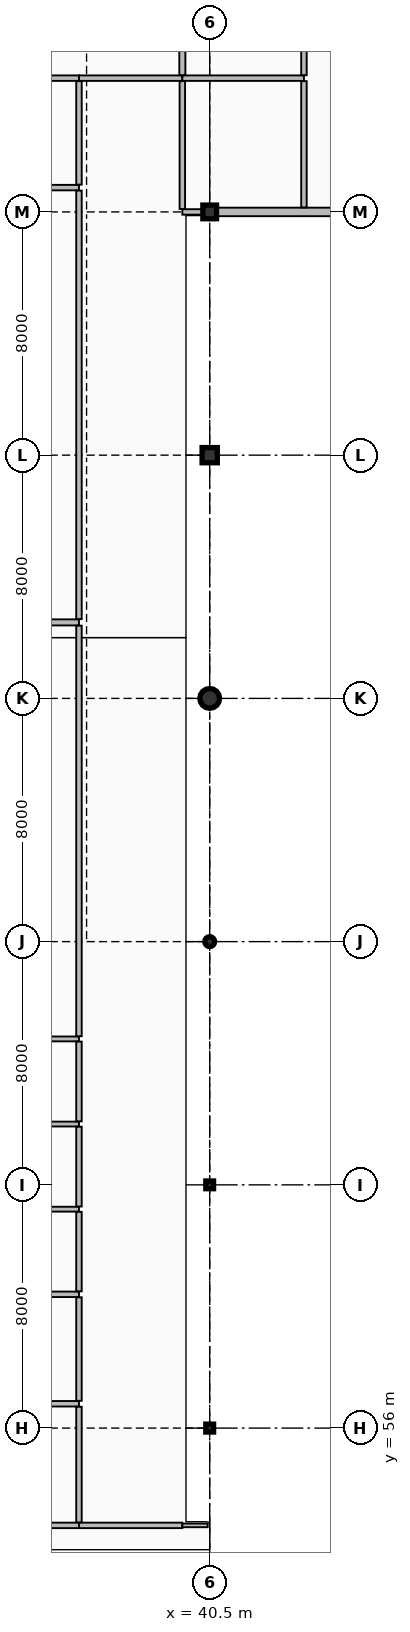
"""IFC4 building model, lengths in metres.
Left out: names, types, materials, properties, quantities, classifications, styles, units other than length and angle.
Written with IfcOpenShell. Run it as: python <this file> out.ifc"""

import sys

from ifc_helpers import new_model, si_unit, direction, frame, frame_2d, origin, origin_2d, place, context, subcontext, project, spatial, rectangle, hollow_rectangle, circle, hollow_circle, i_section, extrude, element, fill, save


model = new_model("IFC4")
c1 = context("Model", 3, precision=1e-05, world=origin(), true_north=direction((0.0, 1.0)))
c2 = subcontext(c1, "Body", "Model", "MODEL_VIEW")
j1 = project(units=[si_unit("LENGTHUNIT", "METRE"), si_unit("PLANEANGLEUNIT", "RADIAN")], contexts=[c1])
p1 = place(None, origin())
s1 = spatial("IfcSite", under=j1, at=p1, CompositionType="ELEMENT")
p2 = place(p1, origin())
s2 = spatial("IfcBuilding", under=s1, at=p2, CompositionType="ELEMENT")
p3 = place(p2, frame((0.0, 0.0, 24.9)))
s3 = spatial("IfcBuildingStorey", under=s2, at=p3, CompositionType="ELEMENT", Elevation=24.9)
p4 = place(p3, frame((40.5, 56.0, 0.0), z_axis=(0.0, 0.0, 1.0), x_axis=(1.0, 0.0, 0.0)))
e1 = element("IfcColumn", 1, at=p4, inside=s3, PredefinedType="COLUMN", context=c2, shape_type="SweptSolid", body=[
    extrude(i_section(OverallWidth=0.256, OverallDepth=0.26, WebThickness=0.011, FlangeThickness=0.017, FilletRadius=0.013, at=origin_2d()), origin(), (0.0, 0.0, 1.0), 4.2),
])
p5 = place(p3, frame((40.5, 64.0, 0.0), z_axis=(0.0, 0.0, 1.0), x_axis=(1.0, 0.0, 0.0)))
e2 = element("IfcColumn", 2, at=p5, inside=s3, PredefinedType="COLUMN", context=c2, shape_type="SweptSolid", body=[
    extrude(hollow_rectangle(XDim=0.254, YDim=0.254, WallThickness=0.013, InnerFilletRadius=0.013, OuterFilletRadius=0.025, at=origin_2d()), origin(), (0.0, 0.0, 1.0), 4.2),
])
p6 = place(p3, frame((40.5, 72.0, 0.0), z_axis=(0.0, 0.0, 1.0), x_axis=(1.0, 0.0, 0.0)))
e3 = element("IfcColumn", 3, at=p6, inside=s3, PredefinedType="COLUMN", context=c2, shape_type="SweptSolid", body=[
    extrude(hollow_circle(Radius=0.162, WallThickness=0.013, at=origin_2d()), origin(), (0.0, 0.0, 1.0), 4.2),
])
p7 = place(p3, frame((40.5, 80.0, 0.0), z_axis=(0.0, 0.0, 1.0), x_axis=(1.0, 0.0, 0.0)))
e4 = element("IfcColumn", 4, at=p7, inside=s3, PredefinedType="COLUMN", context=c2, shape_type="SweptSolid", body=[
    extrude(circle(Radius=0.325, at=origin_2d()), origin(), (0.0, 0.0, 1.0), 4.2),
])
p8 = place(p3, frame((40.5, 88.0, 0.0), z_axis=(0.0, 0.0, 1.0), x_axis=(1.0, 0.0, 0.0)))
e5 = element("IfcColumn", 5, at=p8, inside=s3, PredefinedType="COLUMN", context=c2, shape_type="SweptSolid", body=[
    extrude(rectangle(XDim=0.5, YDim=0.5, at=origin_2d()), origin(), (0.0, 0.0, 1.0), 4.2),
])
p9 = place(p3, frame((40.5, 96.0, 0.0), z_axis=(0.0, 0.0, 1.0), x_axis=(1.0, 0.0, 0.0)))
e6 = element("IfcColumn", 6, at=p9, inside=s3, PredefinedType="COLUMN", context=c2, shape_type="SweptSolid", body=[
    extrude(rectangle(XDim=0.45, YDim=0.45, at=origin_2d()), origin(), (0.0, 0.0, 1.0), 4.2),
])
p10 = place(p3, frame((40.68, 96.0, 0.0), z_axis=(0.0, 0.0, 1.0), x_axis=(1.0, 0.0, 0.0)))
e7 = element("IfcWall", 7, at=p10, inside=s3, PredefinedType="SOLIDWALL", context=c2, shape_type="SweptSolid", body=[
    extrude(rectangle(XDim=5.52, YDim=0.28, at=frame_2d((2.76, 0.0))), origin(), (0.0, 0.0, 1.0), 3.402),
])
p11 = place(p3, frame((29.583, 82.5, 0.0), z_axis=(0.0, 0.0, 1.0), x_axis=(1.0, 0.0, 0.0)))
e8 = element("IfcWall", 8, at=p11, inside=s3, PredefinedType="PARTITIONING", context=c2, shape_type="SweptSolid", body=[
    extrude(rectangle(XDim=6.617, YDim=0.2, at=frame_2d((3.309, 0.0))), origin(), (0.0, 0.0, 1.0), 3.96),
])
p12 = place(p3, frame((28.2, 52.8, 0.0), z_axis=(0.0, 0.0, 1.0), x_axis=(1.0, 0.0, 0.0)))
e9 = element("IfcWall", 9, at=p12, inside=s3, PredefinedType="PARTITIONING", context=c2, shape_type="SweptSolid", body=[
    extrude(rectangle(XDim=8.0, YDim=0.18, at=frame_2d((4.0, 0.0))), origin(), (0.0, 0.0, 1.0), 3.96),
])
p13 = place(p12, frame((3.5, 0.0, 0.0)))
e10 = element("IfcOpeningElement", 10, at=p13, cuts=e9, PredefinedType="OPENING", context=c2, shape_type="SweptSolid", body=[
    extrude(rectangle(XDim=1.0, YDim=2.2, at=frame_2d((0.5, 1.1))), frame((0.0, 0.1, 0.0), z_axis=(0.0, -1.0, 0.0), x_axis=(1.0, 0.0, 0.0)), (0.0, 0.0, 1.0), 0.2),
])
p14 = place(p3, frame((29.2, 96.8, 0.0), z_axis=(0.0, 0.0, 1.0), x_axis=(1.0, 0.0, 0.0)))
e11 = element("IfcWall", 11, at=p14, inside=s3, PredefinedType="PARTITIONING", context=c2, shape_type="SweptSolid", body=[
    extrude(rectangle(XDim=7.0, YDim=0.18, at=frame_2d((3.5, 0.0))), origin(), (0.0, 0.0, 1.0), 3.96),
])
p15 = place(p3, frame((29.425, 100.4, 0.0), z_axis=(0.0, 0.0, 1.0), x_axis=(1.0, 0.0, 0.0)))
e12 = element("IfcWall", 12, at=p15, inside=s3, PredefinedType="PARTITIONING", context=c2, shape_type="SweptSolid", body=[
    extrude(rectangle(XDim=6.775, YDim=0.18, at=frame_2d((3.387, 0.0))), origin(), (0.0, 0.0, 1.0), 3.96),
])
p16 = place(p15, frame((2.913, 0.0, 0.0)))
e13 = element("IfcOpeningElement", 13, at=p16, cuts=e12, PredefinedType="OPENING", context=c2, shape_type="SweptSolid", body=[
    extrude(rectangle(XDim=0.95, YDim=2.15, at=frame_2d((0.475, 1.075))), frame((0.0, 0.1, 0.0), z_axis=(0.0, -1.0, 0.0), x_axis=(1.0, 0.0, 0.0)), (0.0, 0.0, 1.0), 0.2),
])
p17 = place(p3, frame((31.8, 56.8, 0.0), z_axis=(0.0, 0.0, 1.0), x_axis=(1.0, 0.0, 0.0)))
e14 = element("IfcWall", 14, at=p17, inside=s3, PredefinedType="PARTITIONING", context=c2, shape_type="SweptSolid", body=[
    extrude(rectangle(XDim=4.4, YDim=0.18, at=frame_2d((2.2, 0.0))), origin(), (0.0, 0.0, 1.0), 3.96),
])
p18 = place(p3, frame((32.025, 60.4, 0.0), z_axis=(0.0, 0.0, 1.0), x_axis=(1.0, 0.0, 0.0)))
e15 = element("IfcWall", 15, at=p18, inside=s3, PredefinedType="PARTITIONING", context=c2, shape_type="SweptSolid", body=[
    extrude(rectangle(XDim=4.175, YDim=0.18, at=frame_2d((2.087, 0.0))), origin(), (0.0, 0.0, 1.0), 3.96),
])
for number, where, z_axis, x_axis in (
    (16, (32.033, 63.2, 0.0), (0.0, 0.0, 1.0), (1.0, 0.0, 0.0)),
    (17, (32.033, 66.0, 0.0), (0.0, 0.0, 1.0), (1.0, 0.0, 0.0)),
):
    element("IfcWall", number, at=place(p3, frame(where, z_axis=z_axis, x_axis=x_axis)), inside=s3, PredefinedType="PARTITIONING", context=c2, shape_type="SweptSolid", body=[
        extrude(rectangle(XDim=4.167, YDim=0.16, at=frame_2d((2.083, 0.0))), origin(), (0.0, 0.0, 1.0), 3.96),
    ])
p19 = place(p3, frame((32.025, 68.8, 0.0), z_axis=(0.0, 0.0, 1.0), x_axis=(1.0, 0.0, 0.0)))
e18 = element("IfcWall", 18, at=p19, inside=s3, PredefinedType="PARTITIONING", context=c2, shape_type="SweptSolid", body=[
    extrude(rectangle(XDim=4.175, YDim=0.16, at=frame_2d((2.087, 0.0))), origin(), (0.0, 0.0, 1.0), 3.96),
])
for number, where, z_axis, x_axis in (
    (19, (36.2, 52.8, 0.0), (0.0, 0.0, 1.0), (1.0, 0.0, 0.0)),
    (20, (36.2, 100.4, 0.0), (0.0, 0.0, 1.0), (1.0, 0.0, 0.0)),
):
    element("IfcWall", number, at=place(p3, frame(where, z_axis=z_axis, x_axis=x_axis)), inside=s3, PredefinedType="PARTITIONING", context=c2, shape_type="SweptSolid", body=[
        extrude(rectangle(XDim=3.4, YDim=0.18, at=frame_2d((1.7, 0.0))), origin(), (0.0, 0.0, 1.0), 3.96),
    ])
p20 = place(p3, frame((39.6, 52.8, 0.0), z_axis=(0.0, 0.0, 1.0), x_axis=(1.0, 0.0, 0.0)))
e21 = element("IfcWall", 21, at=p20, inside=s3, PredefinedType="PARTITIONING", context=c2, shape_type="SweptSolid", body=[
    extrude(rectangle(XDim=0.835, YDim=0.12, at=frame_2d((0.417, 0.0))), origin(), (0.0, 0.0, 1.0), 3.96),
])
p21 = place(p3, frame((39.6, 96.0, 0.0), z_axis=(0.0, 0.0, 1.0), x_axis=(1.0, 0.0, 0.0)))
e22 = element("IfcWall", 22, at=p21, inside=s3, PredefinedType="PARTITIONING", context=c2, shape_type="SweptSolid", body=[
    extrude(rectangle(XDim=0.667, YDim=0.18, at=frame_2d((0.333, 0.0))), origin(), (0.0, 0.0, 1.0), 3.489),
])
p22 = place(p3, frame((39.6, 100.4, 0.0), z_axis=(0.0, 0.0, 1.0), x_axis=(1.0, 0.0, 0.0)))
e23 = element("IfcWall", 23, at=p22, inside=s3, PredefinedType="PARTITIONING", context=c2, shape_type="SweptSolid", body=[
    extrude(rectangle(XDim=4.0, YDim=0.18, at=frame_2d((2.0, 0.0))), origin(), (0.0, 0.0, 1.0), 3.96),
])
p23 = place(p3, frame((36.2, 52.898, 0.0), z_axis=(0.0, 0.0, 1.0), x_axis=(0.0, 1.0, 0.0)))
e24 = element("IfcWall", 24, at=p23, inside=s3, PredefinedType="PARTITIONING", context=c2, shape_type="SweptSolid", body=[
    extrude(rectangle(XDim=3.804, YDim=0.18, at=frame_2d((1.902, 0.0))), origin(), (0.0, 0.0, 1.0), 3.96),
])
p24 = place(p23, frame((1.352, 0.0, 0.0)))
e25 = element("IfcOpeningElement", 25, at=p24, cuts=e24, PredefinedType="OPENING", context=c2, shape_type="SweptSolid", body=[
    extrude(rectangle(XDim=1.1, YDim=2.2, at=frame_2d((0.55, 1.1))), frame((0.0, 0.1, 0.0), z_axis=(0.0, -1.0, 0.0), x_axis=(1.0, 0.0, 0.0)), (0.0, 0.0, 1.0), 0.2),
])
p25 = place(p3, frame((36.2, 56.898, 0.0), z_axis=(0.0, 0.0, 1.0), x_axis=(0.0, 1.0, 0.0)))
e26 = element("IfcWall", 26, at=p25, inside=s3, PredefinedType="PARTITIONING", context=c2, shape_type="SweptSolid", body=[
    extrude(rectangle(XDim=3.404, YDim=0.18, at=frame_2d((1.702, 0.0))), origin(), (0.0, 0.0, 1.0), 3.96),
])
p26 = place(p25, frame((1.202, 0.0, 0.0)))
e27 = element("IfcOpeningElement", 27, at=p26, cuts=e26, PredefinedType="OPENING", context=c2, shape_type="SweptSolid", body=[
    extrude(rectangle(XDim=1.0, YDim=2.15, at=frame_2d((0.5, 1.075))), frame((0.0, 0.1, 0.0), z_axis=(0.0, -1.0, 0.0), x_axis=(1.0, 0.0, 0.0)), (0.0, 0.0, 1.0), 0.2),
])
p27 = place(p3, frame((36.2, 60.498, 0.0), z_axis=(0.0, 0.0, 1.0), x_axis=(0.0, 1.0, 0.0)))
e28 = element("IfcWall", 28, at=p27, inside=s3, PredefinedType="PARTITIONING", context=c2, shape_type="SweptSolid", body=[
    extrude(rectangle(XDim=2.614, YDim=0.18, at=frame_2d((1.307, 0.0))), origin(), (0.0, 0.0, 1.0), 3.96),
])
p28 = place(p27, frame((0.832, 0.0, 0.0)))
e29 = element("IfcOpeningElement", 29, at=p28, cuts=e28, PredefinedType="OPENING", context=c2, shape_type="SweptSolid", body=[
    extrude(rectangle(XDim=0.95, YDim=2.1, at=frame_2d((0.475, 1.05))), frame((0.0, 0.1, 0.0), z_axis=(0.0, -1.0, 0.0), x_axis=(1.0, 0.0, 0.0)), (0.0, 0.0, 1.0), 0.2),
])
p29 = place(p3, frame((36.2, 63.288, 0.0), z_axis=(0.0, 0.0, 1.0), x_axis=(0.0, 1.0, 0.0)))
e30 = element("IfcWall", 30, at=p29, inside=s3, PredefinedType="PARTITIONING", context=c2, shape_type="SweptSolid", body=[
    extrude(rectangle(XDim=2.624, YDim=0.18, at=frame_2d((1.312, 0.0))), origin(), (0.0, 0.0, 1.0), 3.96),
])
p30 = place(p29, frame((0.837, 0.0, 0.0)))
e31 = element("IfcOpeningElement", 31, at=p30, cuts=e30, PredefinedType="OPENING", context=c2, shape_type="SweptSolid", body=[
    extrude(rectangle(XDim=0.95, YDim=2.1, at=frame_2d((0.475, 1.05))), frame((0.0, 0.1, 0.0), z_axis=(0.0, -1.0, 0.0), x_axis=(1.0, 0.0, 0.0)), (0.0, 0.0, 1.0), 0.2),
])
p31 = place(p3, frame((36.2, 66.088, 0.0), z_axis=(0.0, 0.0, 1.0), x_axis=(0.0, 1.0, 0.0)))
e32 = element("IfcWall", 32, at=p31, inside=s3, PredefinedType="PARTITIONING", context=c2, shape_type="SweptSolid", body=[
    extrude(rectangle(XDim=2.624, YDim=0.18, at=frame_2d((1.312, 0.0))), origin(), (0.0, 0.0, 1.0), 3.96),
])
p32 = place(p31, frame((0.812, 0.0, 0.0)))
e33 = element("IfcOpeningElement", 33, at=p32, cuts=e32, PredefinedType="OPENING", context=c2, shape_type="SweptSolid", body=[
    extrude(rectangle(XDim=1.0, YDim=2.15, at=frame_2d((0.5, 1.075))), frame((0.0, 0.1, 0.0), z_axis=(0.0, -1.0, 0.0), x_axis=(1.0, 0.0, 0.0)), (0.0, 0.0, 1.0), 0.2),
])
p33 = place(p3, frame((36.2, 68.888, 0.0), z_axis=(0.0, 0.0, 1.0), x_axis=(0.0, 1.0, 0.0)))
e34 = element("IfcWall", 34, at=p33, inside=s3, PredefinedType="PARTITIONING", context=c2, shape_type="SweptSolid", body=[
    extrude(rectangle(XDim=13.504, YDim=0.18, at=frame_2d((6.752, 0.0))), origin(), (0.0, 0.0, 1.0), 3.545),
])
p34 = place(p33, frame((6.202, 0.0, 0.0)))
e35 = element("IfcOpeningElement", 35, at=p34, cuts=e34, PredefinedType="OPENING", context=c2, shape_type="SweptSolid", body=[
    extrude(rectangle(XDim=1.1, YDim=2.2, at=frame_2d((0.55, 1.1))), frame((0.0, 0.1, 0.0), z_axis=(0.0, -1.0, 0.0), x_axis=(1.0, 0.0, 0.0)), (0.0, 0.0, 1.0), 0.2),
])
p35 = place(p3, frame((36.2, 82.608, 0.0), z_axis=(0.0, 0.0, 1.0), x_axis=(0.0, 1.0, 0.0)))
e36 = element("IfcWall", 36, at=p35, inside=s3, PredefinedType="PARTITIONING", context=c2, shape_type="SweptSolid", body=[
    extrude(rectangle(XDim=14.094, YDim=0.18, at=frame_2d((7.047, 0.0))), origin(), (0.0, 0.0, 1.0), 3.605),
])
p36 = place(p35, frame((6.547, 0.0, 0.0)))
e37 = element("IfcOpeningElement", 37, at=p36, cuts=e36, PredefinedType="OPENING", context=c2, shape_type="SweptSolid", body=[
    extrude(rectangle(XDim=1.0, YDim=2.2, at=frame_2d((0.5, 1.1))), frame((0.0, 0.1, 0.0), z_axis=(0.0, -1.0, 0.0), x_axis=(1.0, 0.0, 0.0)), (0.0, 0.0, 1.0), 0.2),
])
p37 = place(p3, frame((36.2, 96.898, 0.0), z_axis=(0.0, 0.0, 1.0), x_axis=(0.0, 1.0, 0.0)))
e38 = element("IfcWall", 38, at=p37, inside=s3, PredefinedType="PARTITIONING", context=c2, shape_type="SweptSolid", body=[
    extrude(rectangle(XDim=3.404, YDim=0.18, at=frame_2d((1.702, 0.0))), origin(), (0.0, 0.0, 1.0), 3.649),
])
p38 = place(p37, frame((1.152, 0.0, 0.0)))
e39 = element("IfcOpeningElement", 39, at=p38, cuts=e38, PredefinedType="OPENING", context=c2, shape_type="SweptSolid", body=[
    extrude(rectangle(XDim=1.1, YDim=2.2, at=frame_2d((0.55, 1.1))), frame((0.0, 0.1, 0.0), z_axis=(0.0, -1.0, 0.0), x_axis=(1.0, 0.0, 0.0)), (0.0, 0.0, 1.0), 0.2),
])
p39 = place(p3, frame((39.6, 96.098, 0.0), z_axis=(0.0, 0.0, 1.0), x_axis=(0.0, 1.0, 0.0)))
e40 = element("IfcWall", 40, at=p39, inside=s3, PredefinedType="PARTITIONING", context=c2, shape_type="SweptSolid", body=[
    extrude(rectangle(XDim=4.204, YDim=0.18, at=frame_2d((2.102, 0.0))), origin(), (0.0, 0.0, 1.0), 3.96),
])
p40 = place(p39, frame((1.502, 0.0, 0.0)))
e41 = element("IfcOpeningElement", 41, at=p40, cuts=e40, PredefinedType="OPENING", context=c2, shape_type="SweptSolid", body=[
    extrude(rectangle(XDim=1.2, YDim=2.2, at=frame_2d((0.6, 1.1))), frame((0.0, 0.1, 0.0), z_axis=(0.0, -1.0, 0.0), x_axis=(1.0, 0.0, 0.0)), (0.0, 0.0, 1.0), 0.2),
])
p41 = place(p3, frame((39.6, 100.498, 0.0), z_axis=(0.0, 0.0, 1.0), x_axis=(0.0, 1.0, 0.0)))
e42 = element("IfcWall", 42, at=p41, inside=s3, PredefinedType="PARTITIONING", context=c2, shape_type="SweptSolid", body=[
    extrude(rectangle(XDim=5.677, YDim=0.2, at=frame_2d((2.838, 0.0))), origin(), (0.0, 0.0, 1.0), 3.96),
])
p42 = place(p3, frame((43.6, 96.148, 0.0), z_axis=(0.0, 0.0, 1.0), x_axis=(0.0, 1.0, 0.0)))
e43 = element("IfcWall", 43, at=p42, inside=s3, PredefinedType="PARTITIONING", context=c2, shape_type="SweptSolid", body=[
    extrude(rectangle(XDim=4.154, YDim=0.18, at=frame_2d((2.077, 0.0))), origin(), (0.0, 0.0, 1.0), 3.96),
])
p43 = place(p42, frame((1.527, 0.0, 0.0)))
e44 = element("IfcOpeningElement", 44, at=p43, cuts=e43, PredefinedType="OPENING", context=c2, shape_type="SweptSolid", body=[
    extrude(rectangle(XDim=1.1, YDim=2.2, at=frame_2d((0.55, 1.1))), frame((0.0, 0.1, 0.0), z_axis=(0.0, -1.0, 0.0), x_axis=(1.0, 0.0, 0.0)), (0.0, 0.0, 1.0), 0.2),
])
p44 = place(p3, frame((43.6, 100.498, 0.0), z_axis=(0.0, 0.0, 1.0), x_axis=(0.0, 1.0, 0.0)))
e45 = element("IfcWall", 45, at=p44, inside=s3, PredefinedType="PARTITIONING", context=c2, shape_type="SweptSolid", body=[
    extrude(rectangle(XDim=11.364, YDim=0.18, at=frame_2d((5.682, 0.0))), origin(), (0.0, 0.0, 1.0), 3.96),
])
p45 = place(p44, frame((5.182, 0.0, 0.0)))
e46 = element("IfcOpeningElement", 46, at=p45, cuts=e45, PredefinedType="OPENING", context=c2, shape_type="SweptSolid", body=[
    extrude(rectangle(XDim=1.0, YDim=2.2, at=frame_2d((0.5, 1.1))), frame((0.0, 0.1, 0.0), z_axis=(0.0, -1.0, 0.0), x_axis=(1.0, 0.0, 0.0)), (0.0, 0.0, 1.0), 0.2),
])
p46 = place(p24, origin())
e47 = element("IfcDoor", 47, at=p46, inside=s3, OperationType="SINGLE_SWING_LEFT", PredefinedType="DOOR", context=c2, shape_type="SweptSolid", body=[
    extrude(rectangle(XDim=1.1, YDim=2.2, at=frame_2d((0.55, 1.1))), frame((0.0, 0.025, 0.0), z_axis=(0.0, -1.0, 0.0), x_axis=(1.0, 0.0, 0.0)), (0.0, 0.0, 1.0), 0.05),
])
fill(e25, e47)
p47 = place(p26, origin())
e48 = element("IfcDoor", 48, at=p47, inside=s3, OperationType="SINGLE_SWING_RIGHT", PredefinedType="DOOR", context=c2, shape_type="SweptSolid", body=[
    extrude(rectangle(XDim=1.0, YDim=2.15, at=frame_2d((0.5, 1.075))), frame((0.0, 0.025, 0.0), z_axis=(0.0, -1.0, 0.0), x_axis=(1.0, 0.0, 0.0)), (0.0, 0.0, 1.0), 0.05),
])
fill(e27, e48)
p48 = place(p28, origin())
e49 = element("IfcDoor", 49, at=p48, inside=s3, OperationType="SINGLE_SWING_LEFT", PredefinedType="DOOR", context=c2, shape_type="SweptSolid", body=[
    extrude(rectangle(XDim=0.95, YDim=2.1, at=frame_2d((0.475, 1.05))), frame((0.0, 0.025, 0.0), z_axis=(0.0, -1.0, 0.0), x_axis=(1.0, 0.0, 0.0)), (0.0, 0.0, 1.0), 0.05),
])
fill(e29, e49)
p49 = place(p30, origin())
e50 = element("IfcDoor", 50, at=p49, inside=s3, OperationType="SINGLE_SWING_RIGHT", PredefinedType="DOOR", context=c2, shape_type="SweptSolid", body=[
    extrude(rectangle(XDim=0.95, YDim=2.1, at=frame_2d((0.475, 1.05))), frame((0.0, 0.025, 0.0), z_axis=(0.0, -1.0, 0.0), x_axis=(1.0, 0.0, 0.0)), (0.0, 0.0, 1.0), 0.05),
])
fill(e31, e50)
p50 = place(p32, origin())
e51 = element("IfcDoor", 51, at=p50, inside=s3, OperationType="SINGLE_SWING_LEFT", PredefinedType="DOOR", context=c2, shape_type="SweptSolid", body=[
    extrude(rectangle(XDim=1.0, YDim=2.15, at=frame_2d((0.5, 1.075))), frame((0.0, 0.025, 0.0), z_axis=(0.0, -1.0, 0.0), x_axis=(1.0, 0.0, 0.0)), (0.0, 0.0, 1.0), 0.05),
])
fill(e33, e51)
p51 = place(p34, origin())
e52 = element("IfcDoor", 52, at=p51, inside=s3, OperationType="SINGLE_SWING_RIGHT", PredefinedType="DOOR", context=c2, shape_type="SweptSolid", body=[
    extrude(rectangle(XDim=1.1, YDim=2.2, at=frame_2d((0.55, 1.1))), frame((0.0, 0.025, 0.0), z_axis=(0.0, -1.0, 0.0), x_axis=(1.0, 0.0, 0.0)), (0.0, 0.0, 1.0), 0.05),
])
fill(e35, e52)
p52 = place(p36, origin())
e53 = element("IfcDoor", 53, at=p52, inside=s3, OperationType="SINGLE_SWING_LEFT", PredefinedType="DOOR", context=c2, shape_type="SweptSolid", body=[
    extrude(rectangle(XDim=1.0, YDim=2.2, at=frame_2d((0.5, 1.1))), frame((0.0, 0.025, 0.0), z_axis=(0.0, -1.0, 0.0), x_axis=(1.0, 0.0, 0.0)), (0.0, 0.0, 1.0), 0.05),
])
fill(e37, e53)
p53 = place(p38, origin())
e54 = element("IfcDoor", 54, at=p53, inside=s3, OperationType="SINGLE_SWING_RIGHT", PredefinedType="DOOR", context=c2, shape_type="SweptSolid", body=[
    extrude(rectangle(XDim=1.1, YDim=2.2, at=frame_2d((0.55, 1.1))), frame((0.0, 0.025, 0.0), z_axis=(0.0, -1.0, 0.0), x_axis=(1.0, 0.0, 0.0)), (0.0, 0.0, 1.0), 0.05),
])
fill(e39, e54)
p54 = place(p40, frame((1.2, 0.0, 0.0), z_axis=(0.0, 0.0, 1.0), x_axis=(-1.0, 0.0, 0.0)))
e55 = element("IfcDoor", 55, at=p54, inside=s3, OperationType="SINGLE_SWING_LEFT", PredefinedType="DOOR", context=c2, shape_type="SweptSolid", body=[
    extrude(rectangle(XDim=1.2, YDim=2.2, at=frame_2d((0.6, 1.1))), frame((0.0, 0.025, 0.0), z_axis=(0.0, -1.0, 0.0), x_axis=(1.0, 0.0, 0.0)), (0.0, 0.0, 1.0), 0.05),
])
fill(e41, e55)
p55 = place(p43, origin())
e56 = element("IfcDoor", 56, at=p55, inside=s3, OperationType="SINGLE_SWING_RIGHT", PredefinedType="DOOR", context=c2, shape_type="SweptSolid", body=[
    extrude(rectangle(XDim=1.1, YDim=2.2, at=frame_2d((0.55, 1.1))), frame((0.0, 0.025, 0.0), z_axis=(0.0, -1.0, 0.0), x_axis=(1.0, 0.0, 0.0)), (0.0, 0.0, 1.0), 0.05),
])
fill(e44, e56)
save(model, sys.argv[1])
